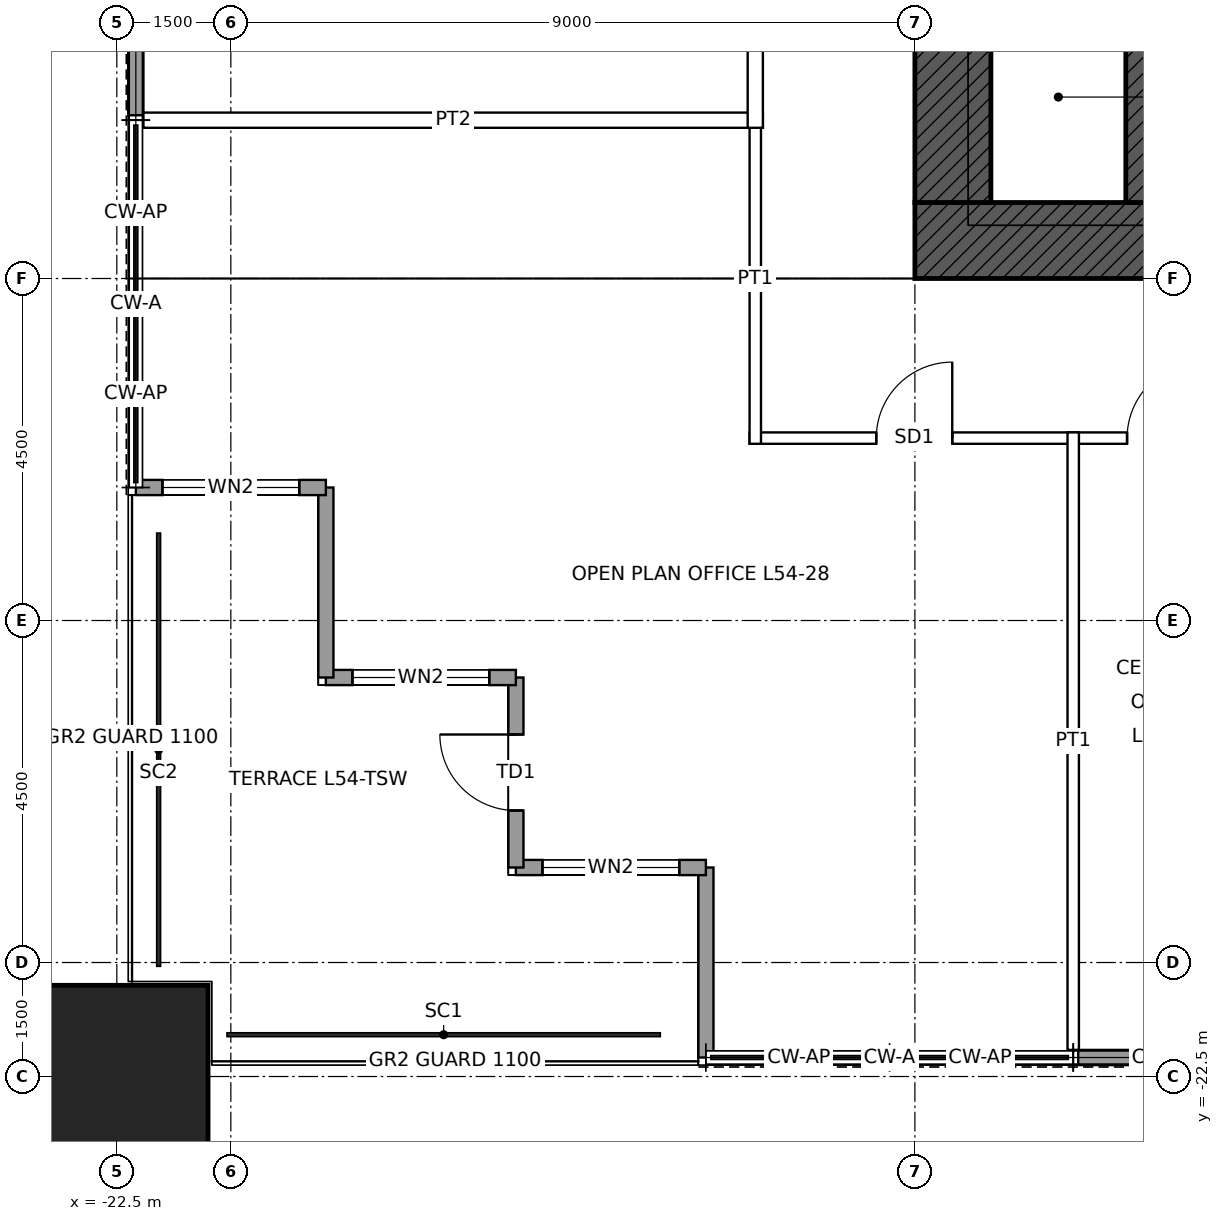
"""IFC4 building model, lengths in metres.
Left out: names, types, materials, properties, quantities, classifications, styles, units other than length and angle.
Written with IfcOpenShell. Run it as: python <this file> out.ifc"""

import sys

from ifc_helpers import new_model, si_unit, direction, frame, frame_2d, origin, origin_2d, place, context, subcontext, project, spatial, rectangle, hollow_rectangle, extrude, element, fill, save


model = new_model("IFC4")
c1 = context("Model", 3, precision=1e-05, world=origin(), true_north=direction((0.0, 1.0)))
c2 = subcontext(c1, "Body", "Model", "MODEL_VIEW")
j1 = project(units=[si_unit("LENGTHUNIT", "METRE"), si_unit("PLANEANGLEUNIT", "RADIAN")], contexts=[c1])
p1 = place(None, origin())
s1 = spatial("IfcSite", under=j1, at=p1, CompositionType="ELEMENT")
p2 = place(p1, origin())
s2 = spatial("IfcBuilding", under=s1, at=p2, CompositionType="ELEMENT")
p3 = place(p2, frame((0.0, 0.0, 249.9)))
s3 = spatial("IfcBuildingStorey", under=s2, at=p3, CompositionType="ELEMENT", Elevation=249.9)
p4 = place(p3, frame((-22.5, -22.5, 0.0), z_axis=(0.0, 0.0, 1.0), x_axis=(1.0, 0.0, 0.0)))
e1 = element("IfcColumn", 1, at=p4, inside=s3, PredefinedType="COLUMN", context=c2, shape_type="SweptSolid", body=[
    extrude(hollow_rectangle(XDim=2.4, YDim=2.4, WallThickness=0.12, at=origin_2d()), origin(), (0.0, 0.0, 1.0), 4.0),
])
p5 = place(p3, frame((12.0, -11.5, 0.0), z_axis=(0.0, 0.0, 1.0), x_axis=(-1.0, 0.0, 0.0)))
e2 = element("IfcWall", 2, at=p5, inside=s3, PredefinedType="SHEAR", context=c2, shape_type="SweptSolid", body=[
    extrude(rectangle(XDim=24.0, YDim=1.0, at=frame_2d((12.0, 0.0))), origin(), (0.0, 0.0, 1.0), 4.0),
])
p6 = place(p5, frame((11.5, 0.0, 0.0)))
e3 = element("IfcOpeningElement", 3, at=p6, cuts=e2, PredefinedType="OPENING", context=c2, shape_type="SweptSolid", body=[
    extrude(rectangle(XDim=1.0, YDim=2.1, at=frame_2d((0.5, 1.05))), frame((0.0, 0.51, 0.0), z_axis=(0.0, -1.0, 0.0), x_axis=(1.0, 0.0, 0.0)), (0.0, 0.0, 1.0), 1.02),
])
p7 = place(p5, frame((1.0, 0.0, 0.0)))
e4 = element("IfcOpeningElement", 4, at=p7, cuts=e2, PredefinedType="OPENING", context=c2, shape_type="SweptSolid", body=[
    extrude(rectangle(XDim=1.0, YDim=2.4, at=frame_2d((0.5, 1.2))), frame((0.0, 0.51, 0.0), z_axis=(0.0, -1.0, 0.0), x_axis=(1.0, 0.0, 0.0)), (0.0, 0.0, 1.0), 1.02),
])
p8 = place(p3, frame((-11.5, -11.0, 0.0), z_axis=(0.0, 0.0, 1.0), x_axis=(0.0, 1.0, 0.0)))
e5 = element("IfcWall", 5, at=p8, inside=s3, PredefinedType="SHEAR", context=c2, shape_type="SweptSolid", body=[
    extrude(rectangle(XDim=22.0, YDim=1.0, at=frame_2d((11.0, 0.0))), origin(), (0.0, 0.0, 1.0), 4.0),
])
p9 = place(p8, frame((10.5, 0.0, 0.0)))
e6 = element("IfcOpeningElement", 6, at=p9, cuts=e5, PredefinedType="OPENING", context=c2, shape_type="SweptSolid", body=[
    extrude(rectangle(XDim=1.0, YDim=2.4, at=frame_2d((0.5, 1.2))), frame((0.0, 0.51, 0.0), z_axis=(0.0, -1.0, 0.0), x_axis=(1.0, 0.0, 0.0)), (0.0, 0.0, 1.0), 1.02),
])
p10 = place(p3, frame((-9.0, -11.0, 0.0), z_axis=(0.0, 0.0, 1.0), x_axis=(0.0, 1.0, 0.0)))
e7 = element("IfcWall", 7, at=p10, inside=s3, PredefinedType="SHEAR", context=c2, shape_type="SweptSolid", body=[
    extrude(rectangle(XDim=6.5, YDim=0.45, at=frame_2d((3.25, 0.0))), origin(), (0.0, 0.0, 1.0), 4.0),
])
p11 = place(p10, frame((4.25, 0.0, 0.0)))
e8 = element("IfcOpeningElement", 8, at=p11, cuts=e7, PredefinedType="OPENING", context=c2, shape_type="SweptSolid", body=[
    extrude(rectangle(XDim=1.0, YDim=2.1, at=frame_2d((0.5, 1.05))), frame((0.0, 0.235, 0.0), z_axis=(0.0, -1.0, 0.0), x_axis=(1.0, 0.0, 0.0)), (0.0, 0.0, 1.0), 0.47),
])
p12 = place(p3, frame((-14.75, -22.25, 0.0), z_axis=(0.0, 0.0, 1.0), x_axis=(0.0, 1.0, 0.0)))
e9 = element("IfcWall", 9, at=p12, inside=s3, PredefinedType="SOLIDWALL", context=c2, shape_type="SweptSolid", body=[
    extrude(rectangle(XDim=2.5, YDim=0.2, at=frame_2d((1.25, 0.0))), origin(), (0.0, 0.0, 1.0), 3.75),
])
p13 = place(p3, frame((-14.75, -19.75, 0.0), z_axis=(0.0, 0.0, 1.0), x_axis=(-1.0, 0.0, 0.0)))
e10 = element("IfcWall", 10, at=p13, inside=s3, PredefinedType="SOLIDWALL", context=c2, shape_type="SweptSolid", body=[
    extrude(rectangle(XDim=2.5, YDim=0.2, at=frame_2d((1.25, 0.0))), origin(), (0.0, 0.0, 1.0), 3.75),
])
p14 = place(p13, frame((0.35, 0.0, 0.3)))
e11 = element("IfcOpeningElement", 11, at=p14, cuts=e10, PredefinedType="OPENING", context=c2, shape_type="SweptSolid", body=[
    extrude(rectangle(XDim=1.8, YDim=2.4, at=frame_2d((0.9, 1.2))), frame((0.0, 0.11, 0.0), z_axis=(0.0, -1.0, 0.0), x_axis=(1.0, 0.0, 0.0)), (0.0, 0.0, 1.0), 0.22),
])
p15 = place(p3, frame((-17.25, -19.75, 0.0), z_axis=(0.0, 0.0, 1.0), x_axis=(0.0, 1.0, 0.0)))
e12 = element("IfcWall", 12, at=p15, inside=s3, PredefinedType="SOLIDWALL", context=c2, shape_type="SweptSolid", body=[
    extrude(rectangle(XDim=2.5, YDim=0.2, at=frame_2d((1.25, 0.0))), origin(), (0.0, 0.0, 1.0), 3.75),
])
p16 = place(p15, frame((0.75, 0.0, 0.0)))
e13 = element("IfcOpeningElement", 13, at=p16, cuts=e12, PredefinedType="OPENING", context=c2, shape_type="SweptSolid", body=[
    extrude(rectangle(XDim=1.0, YDim=2.4, at=frame_2d((0.5, 1.2))), frame((0.0, 0.11, 0.0), z_axis=(0.0, -1.0, 0.0), x_axis=(1.0, 0.0, 0.0)), (0.0, 0.0, 1.0), 0.22),
])
p17 = place(p3, frame((-17.25, -17.25, 0.0), z_axis=(0.0, 0.0, 1.0), x_axis=(-1.0, 0.0, 0.0)))
e14 = element("IfcWall", 14, at=p17, inside=s3, PredefinedType="SOLIDWALL", context=c2, shape_type="SweptSolid", body=[
    extrude(rectangle(XDim=2.5, YDim=0.2, at=frame_2d((1.25, 0.0))), origin(), (0.0, 0.0, 1.0), 3.75),
])
p18 = place(p17, frame((0.35, 0.0, 0.3)))
e15 = element("IfcOpeningElement", 15, at=p18, cuts=e14, PredefinedType="OPENING", context=c2, shape_type="SweptSolid", body=[
    extrude(rectangle(XDim=1.8, YDim=2.4, at=frame_2d((0.9, 1.2))), frame((0.0, 0.11, 0.0), z_axis=(0.0, -1.0, 0.0), x_axis=(1.0, 0.0, 0.0)), (0.0, 0.0, 1.0), 0.22),
])
p19 = place(p3, frame((-19.75, -17.25, 0.0), z_axis=(0.0, 0.0, 1.0), x_axis=(0.0, 1.0, 0.0)))
e16 = element("IfcWall", 16, at=p19, inside=s3, PredefinedType="SOLIDWALL", context=c2, shape_type="SweptSolid", body=[
    extrude(rectangle(XDim=2.5, YDim=0.2, at=frame_2d((1.25, 0.0))), origin(), (0.0, 0.0, 1.0), 3.75),
])
p20 = place(p3, frame((-19.75, -14.75, 0.0), z_axis=(0.0, 0.0, 1.0), x_axis=(-1.0, 0.0, 0.0)))
e17 = element("IfcWall", 17, at=p20, inside=s3, PredefinedType="SOLIDWALL", context=c2, shape_type="SweptSolid", body=[
    extrude(rectangle(XDim=2.5, YDim=0.2, at=frame_2d((1.25, 0.0))), origin(), (0.0, 0.0, 1.0), 3.75),
])
p21 = place(p20, frame((0.35, 0.0, 0.3)))
e18 = element("IfcOpeningElement", 18, at=p21, cuts=e17, PredefinedType="OPENING", context=c2, shape_type="SweptSolid", body=[
    extrude(rectangle(XDim=1.8, YDim=2.4, at=frame_2d((0.9, 1.2))), frame((0.0, 0.11, 0.0), z_axis=(0.0, -1.0, 0.0), x_axis=(1.0, 0.0, 0.0)), (0.0, 0.0, 1.0), 0.22),
])
for number, where, z_axis, x_axis in (
    (19, (-7.565, -22.25, 0.0), (0.0, 0.0, 1.0), (-1.0, 0.0, 0.0)),
    (20, (-22.25, -9.852, 0.0), (0.0, 0.0, 1.0), (0.0, 1.0, 0.0)),
):
    element("IfcWall", number, at=place(p3, frame(where, z_axis=z_axis, x_axis=x_axis)), inside=s3, PredefinedType="SOLIDWALL", context=c2, shape_type="SweptSolid", body=[
        extrude(rectangle(XDim=2.287, YDim=0.2, at=frame_2d((1.144, 0.0))), origin(), (0.0, 0.0, 1.0), 3.75),
    ])
p22 = place(p3, frame((-14.175, -14.1, 0.0), z_axis=(0.0, 0.0, 1.0), x_axis=(1.0, 0.0, 0.0)))
e21 = element("IfcWall", 21, at=p22, inside=s3, PredefinedType="PARTITIONING", context=c2, shape_type="SweptSolid", body=[
    extrude(rectangle(XDim=28.35, YDim=0.15, at=frame_2d((14.175, 0.0))), origin(), (0.0, 0.0, 1.0), 3.75),
])
p23 = place(p22, frame((22.384, 0.0, 0.0)))
e22 = element("IfcOpeningElement", 22, at=p23, cuts=e21, PredefinedType="OPENING", context=c2, shape_type="SweptSolid", body=[
    extrude(rectangle(XDim=1.0, YDim=2.4, at=frame_2d((0.5, 1.2))), frame((0.0, 0.085, 0.0), z_axis=(0.0, -1.0, 0.0), x_axis=(1.0, 0.0, 0.0)), (0.0, 0.0, 1.0), 0.17),
])
p24 = place(p22, frame((19.925, 0.0, 0.0)))
e23 = element("IfcOpeningElement", 23, at=p24, cuts=e21, PredefinedType="OPENING", context=c2, shape_type="SweptSolid", body=[
    extrude(rectangle(XDim=1.0, YDim=2.4, at=frame_2d((0.5, 1.2))), frame((0.0, 0.085, 0.0), z_axis=(0.0, -1.0, 0.0), x_axis=(1.0, 0.0, 0.0)), (0.0, 0.0, 1.0), 0.17),
])
p25 = place(p22, frame((17.425, 0.0, 0.0)))
e24 = element("IfcOpeningElement", 24, at=p25, cuts=e21, PredefinedType="OPENING", context=c2, shape_type="SweptSolid", body=[
    extrude(rectangle(XDim=1.0, YDim=2.4, at=frame_2d((0.5, 1.2))), frame((0.0, 0.085, 0.0), z_axis=(0.0, -1.0, 0.0), x_axis=(1.0, 0.0, 0.0)), (0.0, 0.0, 1.0), 0.17),
])
p26 = place(p22, frame((15.275, 0.0, 0.0)))
e25 = element("IfcOpeningElement", 25, at=p26, cuts=e21, PredefinedType="OPENING", context=c2, shape_type="SweptSolid", body=[
    extrude(rectangle(XDim=1.0, YDim=2.4, at=frame_2d((0.5, 1.2))), frame((0.0, 0.085, 0.0), z_axis=(0.0, -1.0, 0.0), x_axis=(1.0, 0.0, 0.0)), (0.0, 0.0, 1.0), 0.17),
])
p27 = place(p22, frame((11.175, 0.0, 0.0)))
e26 = element("IfcOpeningElement", 26, at=p27, cuts=e21, PredefinedType="OPENING", context=c2, shape_type="SweptSolid", body=[
    extrude(rectangle(XDim=1.0, YDim=2.4, at=frame_2d((0.5, 1.2))), frame((0.0, 0.085, 0.0), z_axis=(0.0, -1.0, 0.0), x_axis=(1.0, 0.0, 0.0)), (0.0, 0.0, 1.0), 0.17),
])
p28 = place(p22, frame((7.425, 0.0, 0.0)))
e27 = element("IfcOpeningElement", 27, at=p28, cuts=e21, PredefinedType="OPENING", context=c2, shape_type="SweptSolid", body=[
    extrude(rectangle(XDim=1.0, YDim=2.4, at=frame_2d((0.5, 1.2))), frame((0.0, 0.085, 0.0), z_axis=(0.0, -1.0, 0.0), x_axis=(1.0, 0.0, 0.0)), (0.0, 0.0, 1.0), 0.17),
])
p29 = place(p22, frame((4.967, 0.0, 0.0)))
e28 = element("IfcOpeningElement", 28, at=p29, cuts=e21, PredefinedType="OPENING", context=c2, shape_type="SweptSolid", body=[
    extrude(rectangle(XDim=1.0, YDim=2.4, at=frame_2d((0.5, 1.2))), frame((0.0, 0.085, 0.0), z_axis=(0.0, -1.0, 0.0), x_axis=(1.0, 0.0, 0.0)), (0.0, 0.0, 1.0), 0.17),
])
p30 = place(p22, frame((25.922, 0.0, 0.0)))
e29 = element("IfcOpeningElement", 29, at=p30, cuts=e21, PredefinedType="OPENING", context=c2, shape_type="SweptSolid", body=[
    extrude(rectangle(XDim=1.0, YDim=2.4, at=frame_2d((0.5, 1.2))), frame((0.0, 0.085, 0.0), z_axis=(0.0, -1.0, 0.0), x_axis=(1.0, 0.0, 0.0)), (0.0, 0.0, 1.0), 0.17),
])
p31 = place(p22, frame((1.667, 0.0, 0.0)))
e30 = element("IfcOpeningElement", 30, at=p31, cuts=e21, PredefinedType="OPENING", context=c2, shape_type="SweptSolid", body=[
    extrude(rectangle(XDim=1.0, YDim=2.4, at=frame_2d((0.5, 1.2))), frame((0.0, 0.085, 0.0), z_axis=(0.0, -1.0, 0.0), x_axis=(1.0, 0.0, 0.0)), (0.0, 0.0, 1.0), 0.17),
])
p32 = place(p3, frame((-22.15, -9.917, 0.0), z_axis=(0.0, 0.0, 1.0), x_axis=(1.0, 0.0, 0.0)))
e31 = element("IfcWall", 31, at=p32, inside=s3, PredefinedType="PARTITIONING", context=c2, shape_type="SweptSolid", body=[
    extrude(rectangle(XDim=8.15, YDim=0.2, at=frame_2d((4.075, 0.0))), origin(), (0.0, 0.0, 1.0), 3.75),
])
p33 = place(p3, frame((-14.1, -14.175, 0.0), z_axis=(0.0, 0.0, 1.0), x_axis=(0.0, 1.0, 0.0)))
e32 = element("IfcWall", 32, at=p33, inside=s3, PredefinedType="PARTITIONING", context=c2, shape_type="SweptSolid", body=[
    extrude(rectangle(XDim=4.333, YDim=0.15, at=frame_2d((2.167, 0.0))), origin(), (0.0, 0.0, 1.0), 3.75),
])
p34 = place(p3, frame((-14.1, -10.017, 0.0), z_axis=(0.0, 0.0, 1.0), x_axis=(0.0, 1.0, 0.0)))
e33 = element("IfcWall", 33, at=p34, inside=s3, PredefinedType="PARTITIONING", context=c2, shape_type="SweptSolid", body=[
    extrude(rectangle(XDim=5.117, YDim=0.2, at=frame_2d((2.559, 0.0))), origin(), (0.0, 0.0, 1.0), 3.75),
])
p35 = place(p34, frame((2.059, 0.0, 0.0)))
e34 = element("IfcOpeningElement", 34, at=p35, cuts=e33, PredefinedType="OPENING", context=c2, shape_type="SweptSolid", body=[
    extrude(rectangle(XDim=1.0, YDim=2.4, at=frame_2d((0.5, 1.2))), frame((0.0, 0.11, 0.0), z_axis=(0.0, -1.0, 0.0), x_axis=(1.0, 0.0, 0.0)), (0.0, 0.0, 1.0), 0.22),
])
p36 = place(p3, frame((-9.917, -22.15, 0.0), z_axis=(0.0, 0.0, 1.0), x_axis=(0.0, 1.0, 0.0)))
e35 = element("IfcWall", 35, at=p36, inside=s3, PredefinedType="PARTITIONING", context=c2, shape_type="SweptSolid", body=[
    extrude(rectangle(XDim=8.125, YDim=0.15, at=frame_2d((4.062, 0.0))), origin(), (0.0, 0.0, 1.0), 3.75),
])
p37 = place(p14, origin())
e36 = element("IfcWindow", 36, at=p37, inside=s3, PartitioningType="SINGLE_PANEL", PredefinedType="WINDOW", context=c2, shape_type="SweptSolid", body=[
    extrude(rectangle(XDim=1.8, YDim=2.4, at=frame_2d((0.9, 1.2))), frame((0.0, 0.03, 0.0), z_axis=(0.0, -1.0, 0.0), x_axis=(1.0, 0.0, 0.0)), (0.0, 0.0, 1.0), 0.06),
])
fill(e11, e36)
p38 = place(p16, origin())
e37 = element("IfcDoor", 37, at=p38, inside=s3, OperationType="SINGLE_SWING_RIGHT", PredefinedType="DOOR", context=c2, shape_type="SweptSolid", body=[
    extrude(rectangle(XDim=1.0, YDim=2.4, at=frame_2d((0.5, 1.2))), frame((0.0, 0.025, 0.0), z_axis=(0.0, -1.0, 0.0), x_axis=(1.0, 0.0, 0.0)), (0.0, 0.0, 1.0), 0.05),
])
fill(e13, e37)
p39 = place(p18, origin())
e38 = element("IfcWindow", 38, at=p39, inside=s3, PartitioningType="SINGLE_PANEL", PredefinedType="WINDOW", context=c2, shape_type="SweptSolid", body=[
    extrude(rectangle(XDim=1.8, YDim=2.4, at=frame_2d((0.9, 1.2))), frame((0.0, 0.03, 0.0), z_axis=(0.0, -1.0, 0.0), x_axis=(1.0, 0.0, 0.0)), (0.0, 0.0, 1.0), 0.06),
])
fill(e15, e38)
p40 = place(p21, origin())
e39 = element("IfcWindow", 39, at=p40, inside=s3, PartitioningType="SINGLE_PANEL", PredefinedType="WINDOW", context=c2, shape_type="SweptSolid", body=[
    extrude(rectangle(XDim=1.8, YDim=2.4, at=frame_2d((0.9, 1.2))), frame((0.0, 0.03, 0.0), z_axis=(0.0, -1.0, 0.0), x_axis=(1.0, 0.0, 0.0)), (0.0, 0.0, 1.0), 0.06),
])
fill(e18, e39)
p41 = place(p29, origin())
e40 = element("IfcDoor", 40, at=p41, inside=s3, OperationType="SINGLE_SWING_RIGHT", PredefinedType="DOOR", context=c2, shape_type="SweptSolid", body=[
    extrude(rectangle(XDim=1.0, YDim=2.4, at=frame_2d((0.5, 1.2))), frame((0.0, 0.025, 0.0), z_axis=(0.0, -1.0, 0.0), x_axis=(1.0, 0.0, 0.0)), (0.0, 0.0, 1.0), 0.05),
])
fill(e28, e40)
p42 = place(p31, origin())
e41 = element("IfcDoor", 41, at=p42, inside=s3, OperationType="SINGLE_SWING_RIGHT", PredefinedType="DOOR", context=c2, shape_type="SweptSolid", body=[
    extrude(rectangle(XDim=1.0, YDim=2.4, at=frame_2d((0.5, 1.2))), frame((0.0, 0.025, 0.0), z_axis=(0.0, -1.0, 0.0), x_axis=(1.0, 0.0, 0.0)), (0.0, 0.0, 1.0), 0.05),
])
fill(e30, e41)
save(model, sys.argv[1])
